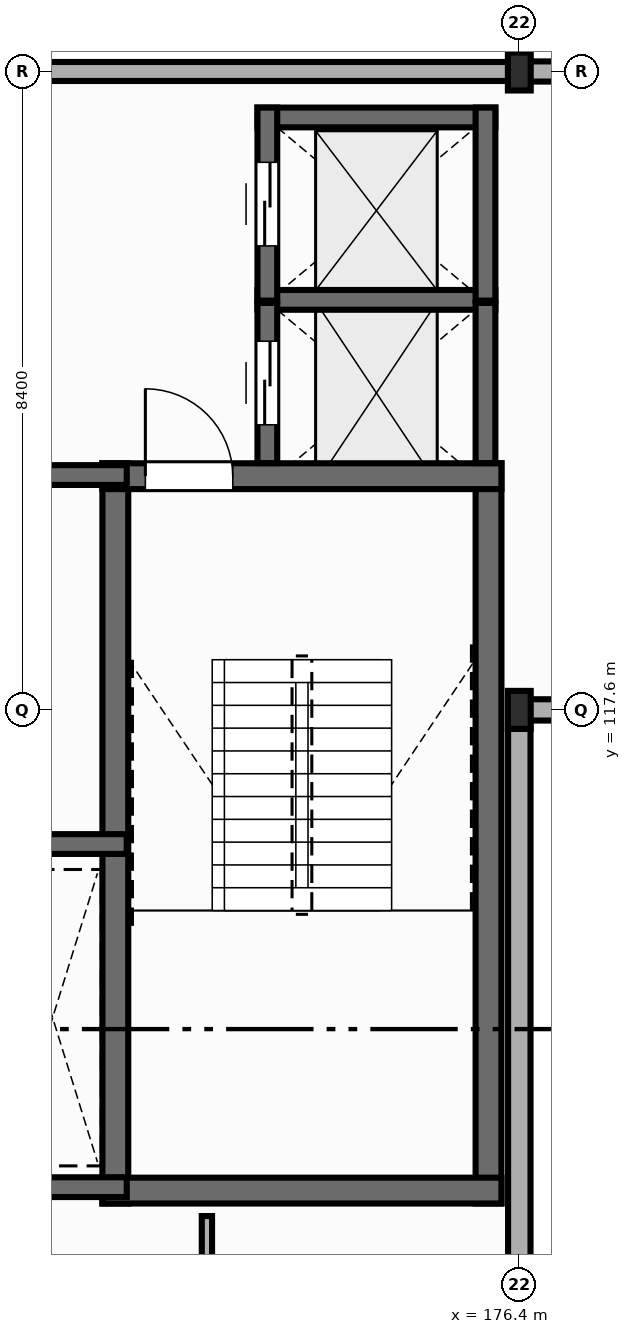
"""IFC4 building model, lengths in metres.
Left out: names, types, materials, properties, quantities, classifications, styles, units other than length and angle.
Written with IfcOpenShell. Run it as: python <this file> out.ifc"""

import sys

from ifc_helpers import new_model, si_unit, direction, frame, frame_2d, origin, origin_2d, place, context, subcontext, project, spatial, rectangle, i_section, extrude, element, fill, save


model = new_model("IFC4")
c1 = context("Model", 3, precision=1e-05, world=origin(), true_north=direction((0.0, 1.0)))
c2 = subcontext(c1, "Body", "Model", "MODEL_VIEW")
j1 = project(units=[si_unit("LENGTHUNIT", "METRE"), si_unit("PLANEANGLEUNIT", "RADIAN")], contexts=[c1])
p1 = place(None, origin())
s1 = spatial("IfcSite", under=j1, at=p1, CompositionType="ELEMENT")
p2 = place(p1, origin())
s2 = spatial("IfcBuilding", under=s1, at=p2, CompositionType="ELEMENT")
p3 = place(p2, frame((0.0, 0.0, 9.9)))
s3 = spatial("IfcBuildingStorey", under=s2, at=p3, CompositionType="ELEMENT", Elevation=9.9)
for number, where, z_axis, x_axis in (
    (1, (176.4, 117.6, 0.0), (0.0, 0.0, 1.0), (1.0, 0.0, 0.0)),
    (2, (176.4, 126.0, 0.0), (0.0, 0.0, 1.0), (1.0, 0.0, 0.0)),
):
    element("IfcColumn", number, at=place(p3, frame(where, z_axis=z_axis, x_axis=x_axis)), inside=s3, PredefinedType="COLUMN", context=c2, shape_type="SweptSolid", body=[
        extrude(i_section(OverallWidth=0.3, OverallDepth=0.5, WebThickness=0.014, FlangeThickness=0.028, FilletRadius=0.027, at=origin_2d()), origin(), (0.0, 0.0, 1.0), 4.05),
    ])
p4 = place(p3, frame((176.4, 109.446, 0.0), z_axis=(0.0, 0.0, 1.0), x_axis=(0.0, 1.0, 0.0)))
e3 = element("IfcWall", 3, at=p4, inside=s3, PredefinedType="STANDARD", context=c2, shape_type="SweptSolid", body=[
    extrude(rectangle(XDim=7.908, YDim=0.295, at=frame_2d((3.954, 0.0))), origin(), (0.0, 0.0, 1.0), 3.472),
])
p5 = place(p3, frame((176.408, 117.6, 0.0), z_axis=(0.0, 0.0, 1.0), x_axis=(1.0, 0.0, 0.0)))
e4 = element("IfcWall", 4, at=p5, inside=s3, PredefinedType="STANDARD", context=c2, shape_type="SweptSolid", body=[
    extrude(rectangle(XDim=8.384, YDim=0.28, at=frame_2d((4.192, 0.0))), origin(), (0.0, 0.0, 1.0), 3.502),
])
p6 = place(p3, frame((184.792, 126.0, 0.0), z_axis=(0.0, 0.0, 1.0), x_axis=(-1.0, 0.0, 0.0)))
e5 = element("IfcWall", 5, at=p6, inside=s3, PredefinedType="STANDARD", context=c2, shape_type="SweptSolid", body=[
    extrude(rectangle(XDim=8.384, YDim=0.265, at=frame_2d((4.192, 0.0))), origin(), (0.0, 0.0, 1.0), 3.472),
])
p7 = place(p3, frame((176.392, 126.0, 0.0), z_axis=(0.0, 0.0, 1.0), x_axis=(-1.0, 0.0, 0.0)))
e6 = element("IfcWall", 6, at=p7, inside=s3, PredefinedType="STANDARD", context=c2, shape_type="SweptSolid", body=[
    extrude(rectangle(XDim=8.384, YDim=0.25, at=frame_2d((4.192, 0.0))), origin(), (0.0, 0.0, 1.0), 3.502),
])
for number, where, z_axis, x_axis in (
    (7, (171.085, 111.105, 0.0), (0.0, 0.0, 1.0), (0.0, 1.0, 0.0)),
    (8, (175.995, 111.105, 0.0), (0.0, 0.0, 1.0), (0.0, 1.0, 0.0)),
):
    element("IfcWall", number, at=place(p3, frame(where, z_axis=z_axis, x_axis=x_axis)), inside=s3, PredefinedType="SHEAR", context=c2, shape_type="SweptSolid", body=[
        extrude(rectangle(XDim=9.74, YDim=0.34, at=frame_2d((4.87, 0.0))), origin(), (0.0, 0.0, 1.0), 3.84),
    ])
p8 = place(p3, frame((170.915, 111.275, 0.0), z_axis=(0.0, 0.0, 1.0), x_axis=(1.0, 0.0, 0.0)))
e9 = element("IfcWall", 9, at=p8, inside=s3, PredefinedType="SHEAR", context=c2, shape_type="SweptSolid", body=[
    extrude(rectangle(XDim=5.25, YDim=0.34, at=frame_2d((2.625, 0.0))), origin(), (0.0, 0.0, 1.0), 3.84),
])
p9 = place(p3, frame((170.915, 120.675, 0.0), z_axis=(0.0, 0.0, 1.0), x_axis=(1.0, 0.0, 0.0)))
e10 = element("IfcWall", 10, at=p9, inside=s3, PredefinedType="SHEAR", context=c2, shape_type="SweptSolid", body=[
    extrude(rectangle(XDim=5.25, YDim=0.34, at=frame_2d((2.625, 0.0))), origin(), (0.0, 0.0, 1.0), 3.84),
])
p10 = place(p9, frame((0.565, 0.0, 0.0)))
e11 = element("IfcOpeningElement", 11, at=p10, cuts=e10, PredefinedType="OPENING", context=c2, shape_type="SweptSolid", body=[
    extrude(rectangle(XDim=1.15, YDim=2.15, at=frame_2d((0.575, 1.075))), frame((0.0, 0.18, 0.0), z_axis=(0.0, -1.0, 0.0), x_axis=(1.0, 0.0, 0.0)), (0.0, 0.0, 1.0), 0.36),
])
p11 = place(p3, frame((172.955, 122.995, 0.0), z_axis=(0.0, 0.0, 1.0), x_axis=(1.0, 0.0, 0.0)))
e12 = element("IfcWall", 12, at=p11, inside=s3, PredefinedType="SHEAR", context=c2, shape_type="SweptSolid", body=[
    extrude(rectangle(XDim=3.13, YDim=0.26, at=frame_2d((1.565, 0.0))), origin(), (0.0, 0.0, 1.0), 3.84),
])
p12 = place(p3, frame((175.955, 120.847, 0.0), z_axis=(0.0, 0.0, 1.0), x_axis=(0.0, 1.0, 0.0)))
e13 = element("IfcWall", 13, at=p12, inside=s3, PredefinedType="SHEAR", context=c2, shape_type="SweptSolid", body=[
    extrude(rectangle(XDim=2.108, YDim=0.26, at=frame_2d((1.054, 0.0))), origin(), (0.0, 0.0, 1.0), 3.84),
])
p13 = place(p3, frame((173.085, 120.847, 0.0), z_axis=(0.0, 0.0, 1.0), x_axis=(0.0, 1.0, 0.0)))
e14 = element("IfcWall", 14, at=p13, inside=s3, PredefinedType="SHEAR", context=c2, shape_type="SweptSolid", body=[
    extrude(rectangle(XDim=2.108, YDim=0.26, at=frame_2d((1.054, 0.0))), origin(), (0.0, 0.0, 1.0), 3.84),
])
p14 = place(p13, frame((0.504, 0.0, 0.0)))
e15 = element("IfcOpeningElement", 15, at=p14, cuts=e14, PredefinedType="OPENING", context=c2, shape_type="SweptSolid", body=[
    extrude(rectangle(XDim=1.1, YDim=2.15, at=frame_2d((0.55, 1.075))), frame((0.0, 0.14, 0.0), z_axis=(0.0, -1.0, 0.0), x_axis=(1.0, 0.0, 0.0)), (0.0, 0.0, 1.0), 0.28),
])
p15 = place(p3, frame((172.955, 125.395, 0.0), z_axis=(0.0, 0.0, 1.0), x_axis=(1.0, 0.0, 0.0)))
e16 = element("IfcWall", 16, at=p15, inside=s3, PredefinedType="SHEAR", context=c2, shape_type="SweptSolid", body=[
    extrude(rectangle(XDim=3.13, YDim=0.26, at=frame_2d((1.565, 0.0))), origin(), (0.0, 0.0, 1.0), 3.84),
])
p16 = place(p3, frame((175.955, 122.985, 0.0), z_axis=(0.0, 0.0, 1.0), x_axis=(0.0, 1.0, 0.0)))
e17 = element("IfcWall", 17, at=p16, inside=s3, PredefinedType="SHEAR", context=c2, shape_type="SweptSolid", body=[
    extrude(rectangle(XDim=2.54, YDim=0.26, at=frame_2d((1.27, 0.0))), origin(), (0.0, 0.0, 1.0), 3.84),
])
p17 = place(p3, frame((173.085, 122.985, 0.0), z_axis=(0.0, 0.0, 1.0), x_axis=(0.0, 1.0, 0.0)))
e18 = element("IfcWall", 18, at=p17, inside=s3, PredefinedType="SHEAR", context=c2, shape_type="SweptSolid", body=[
    extrude(rectangle(XDim=2.54, YDim=0.26, at=frame_2d((1.27, 0.0))), origin(), (0.0, 0.0, 1.0), 3.84),
])
p18 = place(p17, frame((0.72, 0.0, 0.0)))
e19 = element("IfcOpeningElement", 19, at=p18, cuts=e18, PredefinedType="OPENING", context=c2, shape_type="SweptSolid", body=[
    extrude(rectangle(XDim=1.1, YDim=2.15, at=frame_2d((0.55, 1.075))), frame((0.0, 0.14, 0.0), z_axis=(0.0, -1.0, 0.0), x_axis=(1.0, 0.0, 0.0)), (0.0, 0.0, 1.0), 0.28),
])
for number, where, z_axis, x_axis in (
    (20, (168.2, 111.32, 0.0), (0.0, 0.0, 1.0), (1.0, 0.0, 0.0)),
    (21, (168.2, 115.835, 0.0), (0.0, 0.0, 1.0), (1.0, 0.0, 0.0)),
    (22, (168.2, 120.69, 0.0), (0.0, 0.0, 1.0), (1.0, 0.0, 0.0)),
):
    element("IfcWall", number, at=place(p3, frame(where, z_axis=z_axis, x_axis=x_axis)), inside=s3, PredefinedType="SHEAR", context=c2, shape_type="SweptSolid", body=[
        extrude(rectangle(XDim=3.035, YDim=0.26, at=frame_2d((1.518, 0.0))), origin(), (0.0, 0.0, 1.0), 3.84),
    ])
p19 = place(p3, frame((172.29, 105.26, -0.004), z_axis=(0.0, 0.0, 1.0), x_axis=(0.0, 1.0, 0.0)))
e23 = element("IfcWall", 23, at=p19, inside=s3, PredefinedType="STANDARD", context=c2, shape_type="SweptSolid", body=[
    extrude(rectangle(XDim=5.68, YDim=0.135, at=frame_2d((2.84, 0.0))), origin(), (0.0, 0.0, 1.0), 3.844),
])
p20 = place(p10, origin())
e24 = element("IfcDoor", 24, at=p20, inside=s3, OperationType="SINGLE_SWING_LEFT", PredefinedType="DOOR", context=c2, shape_type="SweptSolid", body=[
    extrude(rectangle(XDim=1.15, YDim=2.15, at=frame_2d((0.575, 1.075))), frame((0.0, 0.025, 0.0), z_axis=(0.0, -1.0, 0.0), x_axis=(1.0, 0.0, 0.0)), (0.0, 0.0, 1.0), 0.05),
])
fill(e11, e24)
p21 = place(p14, origin())
e25 = element("IfcDoor", 25, at=p21, inside=s3, OperationType="DOUBLE_DOOR_SLIDING", PredefinedType="DOOR", context=c2, shape_type="SweptSolid", body=[
    extrude(rectangle(XDim=1.1, YDim=2.15, at=frame_2d((0.55, 1.075))), frame((0.0, 0.025, 0.0), z_axis=(0.0, -1.0, 0.0), x_axis=(1.0, 0.0, 0.0)), (0.0, 0.0, 1.0), 0.05),
])
fill(e15, e25)
p22 = place(p18, origin())
e26 = element("IfcDoor", 26, at=p22, inside=s3, OperationType="DOUBLE_DOOR_SLIDING", PredefinedType="DOOR", context=c2, shape_type="SweptSolid", body=[
    extrude(rectangle(XDim=1.1, YDim=2.15, at=frame_2d((0.55, 1.075))), frame((0.0, 0.025, 0.0), z_axis=(0.0, -1.0, 0.0), x_axis=(1.0, 0.0, 0.0)), (0.0, 0.0, 1.0), 0.05),
])
fill(e19, e26)
save(model, sys.argv[1])
